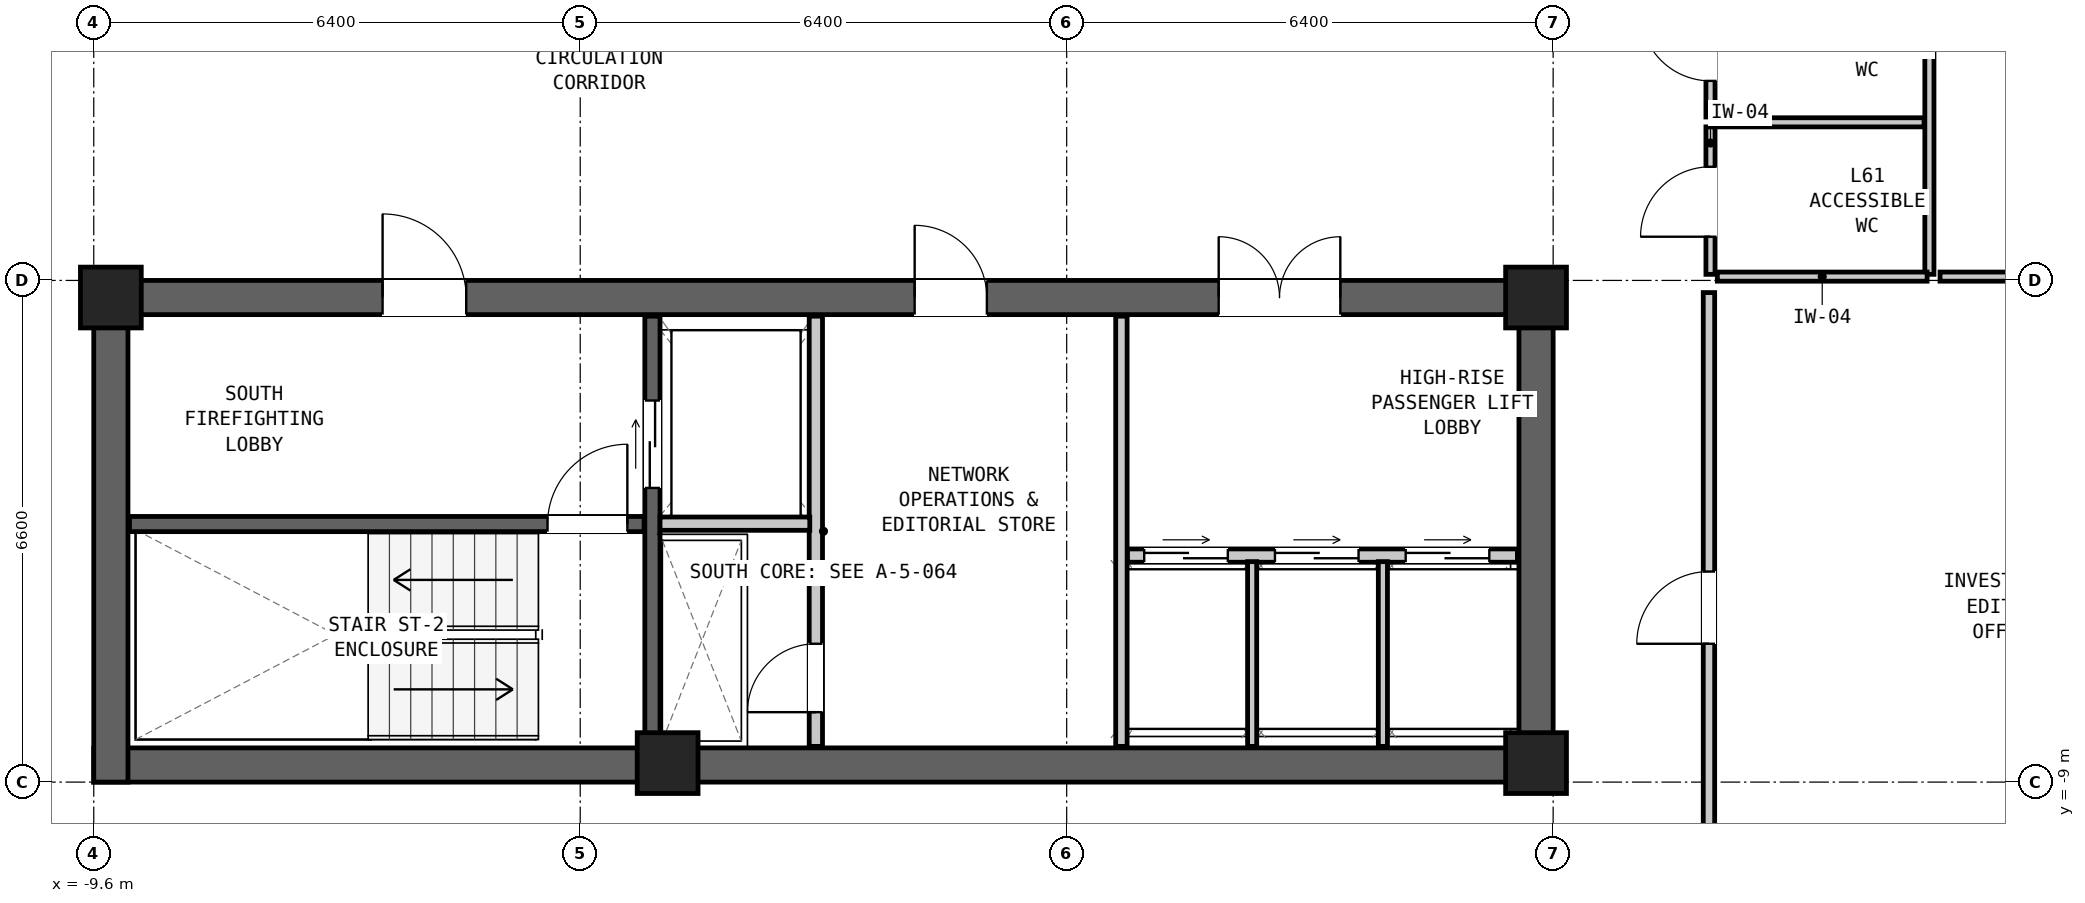
"""IFC4 building model, lengths in metres.
Left out: names, types, materials, properties, quantities, classifications, styles, units other than length and angle.
Written with IfcOpenShell. Run it as: python <this file> out.ifc"""

import sys

from ifc_helpers import new_model, si_unit, direction, frame, frame_2d, origin, origin_2d, place, context, subcontext, project, spatial, rectangle, extrude, element, fill, save


model = new_model("IFC4")
c1 = context("Model", 3, precision=1e-05, world=origin(), true_north=direction((0.0, 1.0)))
c2 = subcontext(c1, "Body", "Model", "MODEL_VIEW")
j1 = project(units=[si_unit("LENGTHUNIT", "METRE"), si_unit("PLANEANGLEUNIT", "RADIAN")], contexts=[c1])
p1 = place(None, origin())
s1 = spatial("IfcSite", under=j1, at=p1, CompositionType="ELEMENT")
p2 = place(p1, origin())
s2 = spatial("IfcBuilding", under=s1, at=p2, CompositionType="ELEMENT")
p3 = place(p2, frame((0.0, 0.0, 208.65)))
s3 = spatial("IfcBuildingStorey", under=s2, at=p3, CompositionType="ELEMENT", Elevation=208.65)
p4 = place(p3, frame((-9.6, -8.775, 0.0), z_axis=(0.0, 0.0, 1.0), x_axis=(1.0, 0.0, 0.0)))
e1 = element("IfcWall", 1, at=p4, inside=s3, PredefinedType="SHEAR", context=c2, shape_type="SweptSolid", body=[
    extrude(rectangle(XDim=19.2, YDim=0.45, at=frame_2d((9.6, 0.0))), origin(), (0.0, 0.0, 1.0), 3.05),
])
p5 = place(p3, frame((-9.6, -2.625, 0.0), z_axis=(0.0, 0.0, 1.0), x_axis=(1.0, 0.0, 0.0)))
e2 = element("IfcWall", 2, at=p5, inside=s3, PredefinedType="SHEAR", context=c2, shape_type="SweptSolid", body=[
    extrude(rectangle(XDim=19.2, YDim=0.45, at=frame_2d((9.6, 0.0))), origin(), (0.0, 0.0, 1.0), 3.05),
])
p6 = place(p5, frame((3.8, 0.0, 0.0)))
e3 = element("IfcOpeningElement", 3, at=p6, cuts=e2, PredefinedType="OPENING", context=c2, shape_type="SweptSolid", body=[
    extrude(rectangle(XDim=1.1, YDim=2.08, at=frame_2d((0.55, 1.04))), frame((0.0, 0.237, 0.0), z_axis=(0.0, -1.0, 0.0), x_axis=(1.0, 0.0, 0.0)), (0.0, 0.0, 1.0), 0.474),
])
p7 = place(p5, frame((10.8, 0.0, 0.0)))
e4 = element("IfcOpeningElement", 4, at=p7, cuts=e2, PredefinedType="OPENING", context=c2, shape_type="SweptSolid", body=[
    extrude(rectangle(XDim=0.95, YDim=2.1, at=frame_2d((0.475, 1.05))), frame((0.0, 0.237, 0.0), z_axis=(0.0, -1.0, 0.0), x_axis=(1.0, 0.0, 0.0)), (0.0, 0.0, 1.0), 0.474),
])
p8 = place(p5, frame((14.8, 0.0, 0.0)))
e5 = element("IfcOpeningElement", 5, at=p8, cuts=e2, PredefinedType="OPENING", context=c2, shape_type="SweptSolid", body=[
    extrude(rectangle(XDim=1.6, YDim=2.12, at=frame_2d((0.8, 1.06))), frame((0.0, 0.237, 0.0), z_axis=(0.0, -1.0, 0.0), x_axis=(1.0, 0.0, 0.0)), (0.0, 0.0, 1.0), 0.474),
])
for number, where, z_axis, x_axis in (
    (6, (-9.375, -9.0, 0.0), (0.0, 0.0, 1.0), (0.0, 1.0, 0.0)),
    (7, (9.375, -9.0, 0.0), (0.0, 0.0, 1.0), (0.0, 1.0, 0.0)),
):
    element("IfcWall", number, at=place(p3, frame(where, z_axis=z_axis, x_axis=x_axis)), inside=s3, PredefinedType="SHEAR", context=c2, shape_type="SweptSolid", body=[
        extrude(rectangle(XDim=6.6, YDim=0.45, at=frame_2d((3.3, 0.0))), origin(), (0.0, 0.0, 1.0), 3.05),
    ])
for number, where, z_axis, x_axis in (
    (8, (-9.375, -2.625, 0.0), (0.0, 0.0, 1.0), (1.0, 0.0, 0.0)),
    (9, (9.375, -2.625, 0.0), (0.0, 0.0, 1.0), (1.0, 0.0, 0.0)),
    (10, (-2.05, -8.75, 0.0), (0.0, 0.0, 1.0), (1.0, 0.0, 0.0)),
    (11, (9.375, -8.75, 0.0), (0.0, 0.0, 1.0), (1.0, 0.0, 0.0)),
):
    element("IfcColumn", number, at=place(p3, frame(where, z_axis=z_axis, x_axis=x_axis)), inside=s3, PredefinedType="COLUMN", context=c2, shape_type="SweptSolid", body=[
        extrude(rectangle(XDim=0.8, YDim=0.8, at=origin_2d()), origin(), (0.0, 0.0, 1.0), 3.05),
    ])
p9 = place(p3, frame((-9.13, -5.605, 0.0), z_axis=(0.0, 0.0, 1.0), x_axis=(1.0, 0.0, 0.0)))
e12 = element("IfcWall", 12, at=p9, inside=s3, PredefinedType="SHEAR", context=c2, shape_type="SweptSolid", body=[
    extrude(rectangle(XDim=6.77, YDim=0.2, at=frame_2d((3.385, 0.0))), origin(), (0.0, 0.0, 1.0), 2.86),
])
p10 = place(p9, frame((5.5, 0.0, 0.0)))
e13 = element("IfcOpeningElement", 13, at=p10, cuts=e12, PredefinedType="OPENING", context=c2, shape_type="SweptSolid", body=[
    extrude(rectangle(XDim=1.05, YDim=2.08, at=frame_2d((0.525, 1.04))), frame((0.0, 0.112, 0.0), z_axis=(0.0, -1.0, 0.0), x_axis=(1.0, 0.0, 0.0)), (0.0, 0.0, 1.0), 0.224),
])
p11 = place(p3, frame((-2.25, -8.53, 0.0), z_axis=(0.0, 0.0, 1.0), x_axis=(0.0, 1.0, 0.0)))
e14 = element("IfcWall", 14, at=p11, inside=s3, PredefinedType="SHEAR", context=c2, shape_type="SweptSolid", body=[
    extrude(rectangle(XDim=5.66, YDim=0.2, at=frame_2d((2.83, 0.0))), origin(), (0.0, 0.0, 1.0), 2.86),
])
p12 = place(p11, frame((3.4, 0.0, 0.0)))
e15 = element("IfcOpeningElement", 15, at=p12, cuts=e14, PredefinedType="OPENING", context=c2, shape_type="SweptSolid", body=[
    extrude(rectangle(XDim=1.15, YDim=2.08, at=frame_2d((0.575, 1.04))), frame((0.0, 0.112, 0.0), z_axis=(0.0, -1.0, 0.0), x_axis=(1.0, 0.0, 0.0)), (0.0, 0.0, 1.0), 0.224),
])
p13 = place(p3, frame((-0.1, -8.53, 0.0), z_axis=(0.0, 0.0, 1.0), x_axis=(0.0, 1.0, 0.0)))
e16 = element("IfcWall", 16, at=p13, inside=s3, PredefinedType="PARTITIONING", context=c2, shape_type="SweptSolid", body=[
    extrude(rectangle(XDim=5.66, YDim=0.175, at=frame_2d((2.83, 0.0))), origin(), (0.0, 0.0, 1.0), 2.86),
])
p14 = place(p13, frame((0.45, 0.0, 0.0)))
e17 = element("IfcOpeningElement", 17, at=p14, cuts=e16, PredefinedType="OPENING", context=c2, shape_type="SweptSolid", body=[
    extrude(rectangle(XDim=0.9, YDim=2.05, at=frame_2d((0.45, 1.025))), frame((0.0, 0.1, 0.0), z_axis=(0.0, -1.0, 0.0), x_axis=(1.0, 0.0, 0.0)), (0.0, 0.0, 1.0), 0.199),
])
p15 = place(p3, frame((-2.15, -5.6, 0.0), z_axis=(0.0, 0.0, 1.0), x_axis=(1.0, 0.0, 0.0)))
e18 = element("IfcWall", 18, at=p15, inside=s3, PredefinedType="PARTITIONING", context=c2, shape_type="SweptSolid", body=[
    extrude(rectangle(XDim=1.97, YDim=0.175, at=frame_2d((0.985, 0.0))), origin(), (0.0, 0.0, 1.0), 2.86),
])
p16 = place(p3, frame((3.92, -8.53, 0.0), z_axis=(0.0, 0.0, 1.0), x_axis=(0.0, 1.0, 0.0)))
e19 = element("IfcWall", 19, at=p16, inside=s3, PredefinedType="PARTITIONING", context=c2, shape_type="SweptSolid", body=[
    extrude(rectangle(XDim=5.66, YDim=0.15, at=frame_2d((2.83, 0.0))), origin(), (0.0, 0.0, 1.0), 2.86),
])
p17 = place(p3, frame((4.0, -6.02, 0.0), z_axis=(0.0, 0.0, 1.0), x_axis=(1.0, 0.0, 0.0)))
e20 = element("IfcWall", 20, at=p17, inside=s3, PredefinedType="PARTITIONING", context=c2, shape_type="SweptSolid", body=[
    extrude(rectangle(XDim=5.13, YDim=0.175, at=frame_2d((2.565, 0.0))), origin(), (0.0, 0.0, 1.0), 2.86),
])
p18 = place(p17, frame((0.22, 0.0, 0.0)))
e21 = element("IfcOpeningElement", 21, at=p18, cuts=e20, PredefinedType="OPENING", context=c2, shape_type="SweptSolid", body=[
    extrude(rectangle(XDim=1.1, YDim=2.06, at=frame_2d((0.55, 1.03))), frame((0.0, 0.1, 0.0), z_axis=(0.0, -1.0, 0.0), x_axis=(1.0, 0.0, 0.0)), (0.0, 0.0, 1.0), 0.199),
])
p19 = place(p17, frame((1.94, 0.0, 0.0)))
e22 = element("IfcOpeningElement", 22, at=p19, cuts=e20, PredefinedType="OPENING", context=c2, shape_type="SweptSolid", body=[
    extrude(rectangle(XDim=1.1, YDim=2.06, at=frame_2d((0.55, 1.03))), frame((0.0, 0.1, 0.0), z_axis=(0.0, -1.0, 0.0), x_axis=(1.0, 0.0, 0.0)), (0.0, 0.0, 1.0), 0.199),
])
p20 = place(p17, frame((3.66, 0.0, 0.0)))
e23 = element("IfcOpeningElement", 23, at=p20, cuts=e20, PredefinedType="OPENING", context=c2, shape_type="SweptSolid", body=[
    extrude(rectangle(XDim=1.1, YDim=2.06, at=frame_2d((0.55, 1.03))), frame((0.0, 0.1, 0.0), z_axis=(0.0, -1.0, 0.0), x_axis=(1.0, 0.0, 0.0)), (0.0, 0.0, 1.0), 0.199),
])
for number, where, z_axis, x_axis in (
    (24, (5.64, -8.53, 0.0), (0.0, 0.0, 1.0), (0.0, 1.0, 0.0)),
    (25, (7.36, -8.53, 0.0), (0.0, 0.0, 1.0), (0.0, 1.0, 0.0)),
):
    element("IfcWall", number, at=place(p3, frame(where, z_axis=z_axis, x_axis=x_axis)), inside=s3, PredefinedType="PARTITIONING", context=c2, shape_type="SweptSolid", body=[
        extrude(rectangle(XDim=2.43, YDim=0.12, at=frame_2d((1.215, 0.0))), origin(), (0.0, 0.0, 1.0), 2.86),
    ])
p21 = place(p3, frame((11.67, -2.32, 0.0), z_axis=(0.0, 0.0, 1.0), x_axis=(0.0, 1.0, 0.0)))
e26 = element("IfcWall", 26, at=p21, inside=s3, PredefinedType="PARTITIONING", context=c2, shape_type="SweptSolid", body=[
    extrude(rectangle(XDim=1.94, YDim=0.12, at=frame_2d((0.97, 0.0))), origin(), (0.0, 0.0, 1.0), 2.86),
])
p22 = place(p21, frame((0.495, 0.0, 0.0)))
e27 = element("IfcOpeningElement", 27, at=p22, cuts=e26, PredefinedType="OPENING", context=c2, shape_type="SweptSolid", body=[
    extrude(rectangle(XDim=0.92, YDim=2.1, at=frame_2d((0.46, 1.05))), frame((0.0, 0.072, 0.0), z_axis=(0.0, -1.0, 0.0), x_axis=(1.0, 0.0, 0.0)), (0.0, 0.0, 1.0), 0.144),
])
p23 = place(p3, frame((11.67, -0.25, 0.0), z_axis=(0.0, 0.0, 1.0), x_axis=(0.0, 1.0, 0.0)))
e28 = element("IfcWall", 28, at=p23, inside=s3, PredefinedType="PARTITIONING", context=c2, shape_type="SweptSolid", body=[
    extrude(rectangle(XDim=1.9, YDim=0.12, at=frame_2d((0.95, 0.0))), origin(), (0.0, 0.0, 1.0), 2.86),
])
p24 = place(p23, frame((0.475, 0.0, 0.0)))
e29 = element("IfcOpeningElement", 29, at=p24, cuts=e28, PredefinedType="OPENING", context=c2, shape_type="SweptSolid", body=[
    extrude(rectangle(XDim=0.92, YDim=2.1, at=frame_2d((0.46, 1.05))), frame((0.0, 0.072, 0.0), z_axis=(0.0, -1.0, 0.0), x_axis=(1.0, 0.0, 0.0)), (0.0, 0.0, 1.0), 0.144),
])
p25 = place(p3, frame((14.55, -2.32, 0.0), z_axis=(0.0, 0.0, 1.0), x_axis=(0.0, 1.0, 0.0)))
e30 = element("IfcWall", 30, at=p25, inside=s3, PredefinedType="PARTITIONING", context=c2, shape_type="SweptSolid", body=[
    extrude(rectangle(XDim=5.93, YDim=0.12, at=frame_2d((2.965, 0.0))), origin(), (0.0, 0.0, 1.0), 2.86),
])
p26 = place(p3, frame((11.76, -2.35, 0.0), z_axis=(0.0, 0.0, 1.0), x_axis=(1.0, 0.0, 0.0)))
e31 = element("IfcWall", 31, at=p26, inside=s3, PredefinedType="PARTITIONING", context=c2, shape_type="SweptSolid", body=[
    extrude(rectangle(XDim=2.76, YDim=0.12, at=frame_2d((1.38, 0.0))), origin(), (0.0, 0.0, 1.0), 1.981),
])
p27 = place(p3, frame((11.76, -0.32, 0.0), z_axis=(0.0, 0.0, 1.0), x_axis=(1.0, 0.0, 0.0)))
e32 = element("IfcWall", 32, at=p27, inside=s3, PredefinedType="PARTITIONING", context=c2, shape_type="SweptSolid", body=[
    extrude(rectangle(XDim=2.72, YDim=0.12, at=frame_2d((1.36, 0.0))), origin(), (0.0, 0.0, 1.0), 2.86),
])
p28 = place(p3, frame((14.69, -2.35, 0.0), z_axis=(0.0, 0.0, 1.0), x_axis=(1.0, 0.0, 0.0)))
e33 = element("IfcWall", 33, at=p28, inside=s3, PredefinedType="PARTITIONING", context=c2, shape_type="SweptSolid", body=[
    extrude(rectangle(XDim=4.69, YDim=0.12, at=frame_2d((2.345, 0.0))), origin(), (0.0, 0.0, 1.0), 1.981),
])
p29 = place(p3, frame((11.65, -10.85, 0.0), z_axis=(0.0, 0.0, 1.0), x_axis=(0.0, 1.0, 0.0)))
e34 = element("IfcWall", 34, at=p29, inside=s3, PredefinedType="PARTITIONING", context=c2, shape_type="SweptSolid", body=[
    extrude(rectangle(XDim=8.29, YDim=0.15, at=frame_2d((4.145, 0.0))), origin(), (0.0, 0.0, 1.0), 2.86),
])
p30 = place(p29, frame((3.67, 0.0, 0.0)))
e35 = element("IfcOpeningElement", 35, at=p30, cuts=e34, PredefinedType="OPENING", context=c2, shape_type="SweptSolid", body=[
    extrude(rectangle(XDim=0.95, YDim=2.1, at=frame_2d((0.475, 1.05))), frame((0.0, 0.087, 0.0), z_axis=(0.0, -1.0, 0.0), x_axis=(1.0, 0.0, 0.0)), (0.0, 0.0, 1.0), 0.174),
])
p31 = place(p10, origin())
e36 = element("IfcDoor", 36, at=p31, inside=s3, OperationType="SINGLE_SWING_RIGHT", PredefinedType="DOOR", context=c2, shape_type="SweptSolid", body=[
    extrude(rectangle(XDim=1.05, YDim=2.08, at=frame_2d((0.525, 1.04))), frame((0.0, 0.025, 0.0), z_axis=(0.0, -1.0, 0.0), x_axis=(1.0, 0.0, 0.0)), (0.0, 0.0, 1.0), 0.05),
])
fill(e13, e36)
p32 = place(p6, origin())
e37 = element("IfcDoor", 37, at=p32, inside=s3, OperationType="SINGLE_SWING_LEFT", PredefinedType="DOOR", context=c2, shape_type="SweptSolid", body=[
    extrude(rectangle(XDim=1.1, YDim=2.08, at=frame_2d((0.55, 1.04))), frame((0.0, 0.025, 0.0), z_axis=(0.0, -1.0, 0.0), x_axis=(1.0, 0.0, 0.0)), (0.0, 0.0, 1.0), 0.05),
])
fill(e3, e37)
p33 = place(p12, origin())
e38 = element("IfcDoor", 38, at=p33, inside=s3, OperationType="DOUBLE_DOOR_SLIDING", PredefinedType="DOOR", context=c2, shape_type="SweptSolid", body=[
    extrude(rectangle(XDim=1.15, YDim=2.08, at=frame_2d((0.575, 1.04))), frame((0.0, 0.025, 0.0), z_axis=(0.0, -1.0, 0.0), x_axis=(1.0, 0.0, 0.0)), (0.0, 0.0, 1.0), 0.05),
])
fill(e15, e38)
p34 = place(p14, origin())
e39 = element("IfcDoor", 39, at=p34, inside=s3, OperationType="SINGLE_SWING_LEFT", PredefinedType="DOOR", context=c2, shape_type="SweptSolid", body=[
    extrude(rectangle(XDim=0.9, YDim=2.05, at=frame_2d((0.45, 1.025))), frame((0.0, 0.025, 0.0), z_axis=(0.0, -1.0, 0.0), x_axis=(1.0, 0.0, 0.0)), (0.0, 0.0, 1.0), 0.05),
])
fill(e17, e39)
p35 = place(p7, origin())
e40 = element("IfcDoor", 40, at=p35, inside=s3, OperationType="SINGLE_SWING_LEFT", PredefinedType="DOOR", context=c2, shape_type="SweptSolid", body=[
    extrude(rectangle(XDim=0.95, YDim=2.1, at=frame_2d((0.475, 1.05))), frame((0.0, 0.025, 0.0), z_axis=(0.0, -1.0, 0.0), x_axis=(1.0, 0.0, 0.0)), (0.0, 0.0, 1.0), 0.05),
])
fill(e4, e40)
p36 = place(p18, origin())
e41 = element("IfcDoor", 41, at=p36, inside=s3, OperationType="DOUBLE_DOOR_SLIDING", PredefinedType="DOOR", context=c2, shape_type="SweptSolid", body=[
    extrude(rectangle(XDim=1.1, YDim=2.06, at=frame_2d((0.55, 1.03))), frame((0.0, 0.025, 0.0), z_axis=(0.0, -1.0, 0.0), x_axis=(1.0, 0.0, 0.0)), (0.0, 0.0, 1.0), 0.05),
])
fill(e21, e41)
p37 = place(p19, origin())
e42 = element("IfcDoor", 42, at=p37, inside=s3, OperationType="DOUBLE_DOOR_SLIDING", PredefinedType="DOOR", context=c2, shape_type="SweptSolid", body=[
    extrude(rectangle(XDim=1.1, YDim=2.06, at=frame_2d((0.55, 1.03))), frame((0.0, 0.025, 0.0), z_axis=(0.0, -1.0, 0.0), x_axis=(1.0, 0.0, 0.0)), (0.0, 0.0, 1.0), 0.05),
])
fill(e22, e42)
p38 = place(p20, origin())
e43 = element("IfcDoor", 43, at=p38, inside=s3, OperationType="DOUBLE_DOOR_SLIDING", PredefinedType="DOOR", context=c2, shape_type="SweptSolid", body=[
    extrude(rectangle(XDim=1.1, YDim=2.06, at=frame_2d((0.55, 1.03))), frame((0.0, 0.025, 0.0), z_axis=(0.0, -1.0, 0.0), x_axis=(1.0, 0.0, 0.0)), (0.0, 0.0, 1.0), 0.05),
])
fill(e23, e43)
p39 = place(p8, origin())
e44 = element("IfcDoor", 44, at=p39, inside=s3, OperationType="DOUBLE_DOOR_SINGLE_SWING", PredefinedType="DOOR", context=c2, shape_type="SweptSolid", body=[
    extrude(rectangle(XDim=1.6, YDim=2.12, at=frame_2d((0.8, 1.06))), frame((0.0, 0.025, 0.0), z_axis=(0.0, -1.0, 0.0), x_axis=(1.0, 0.0, 0.0)), (0.0, 0.0, 1.0), 0.05),
])
fill(e5, e44)
p40 = place(p22, origin())
e45 = element("IfcDoor", 45, at=p40, inside=s3, OperationType="SINGLE_SWING_LEFT", PredefinedType="DOOR", context=c2, shape_type="SweptSolid", body=[
    extrude(rectangle(XDim=0.92, YDim=2.1, at=frame_2d((0.46, 1.05))), frame((0.0, 0.025, 0.0), z_axis=(0.0, -1.0, 0.0), x_axis=(1.0, 0.0, 0.0)), (0.0, 0.0, 1.0), 0.05),
])
fill(e27, e45)
p41 = place(p24, origin())
e46 = element("IfcDoor", 46, at=p41, inside=s3, OperationType="SINGLE_SWING_RIGHT", PredefinedType="DOOR", context=c2, shape_type="SweptSolid", body=[
    extrude(rectangle(XDim=0.92, YDim=2.1, at=frame_2d((0.46, 1.05))), frame((0.0, 0.025, 0.0), z_axis=(0.0, -1.0, 0.0), x_axis=(1.0, 0.0, 0.0)), (0.0, 0.0, 1.0), 0.05),
])
fill(e29, e46)
p42 = place(p30, origin())
e47 = element("IfcDoor", 47, at=p42, inside=s3, OperationType="SINGLE_SWING_LEFT", PredefinedType="DOOR", context=c2, shape_type="SweptSolid", body=[
    extrude(rectangle(XDim=0.95, YDim=2.1, at=frame_2d((0.475, 1.05))), frame((0.0, 0.025, 0.0), z_axis=(0.0, -1.0, 0.0), x_axis=(1.0, 0.0, 0.0)), (0.0, 0.0, 1.0), 0.05),
])
fill(e35, e47)
save(model, sys.argv[1])
